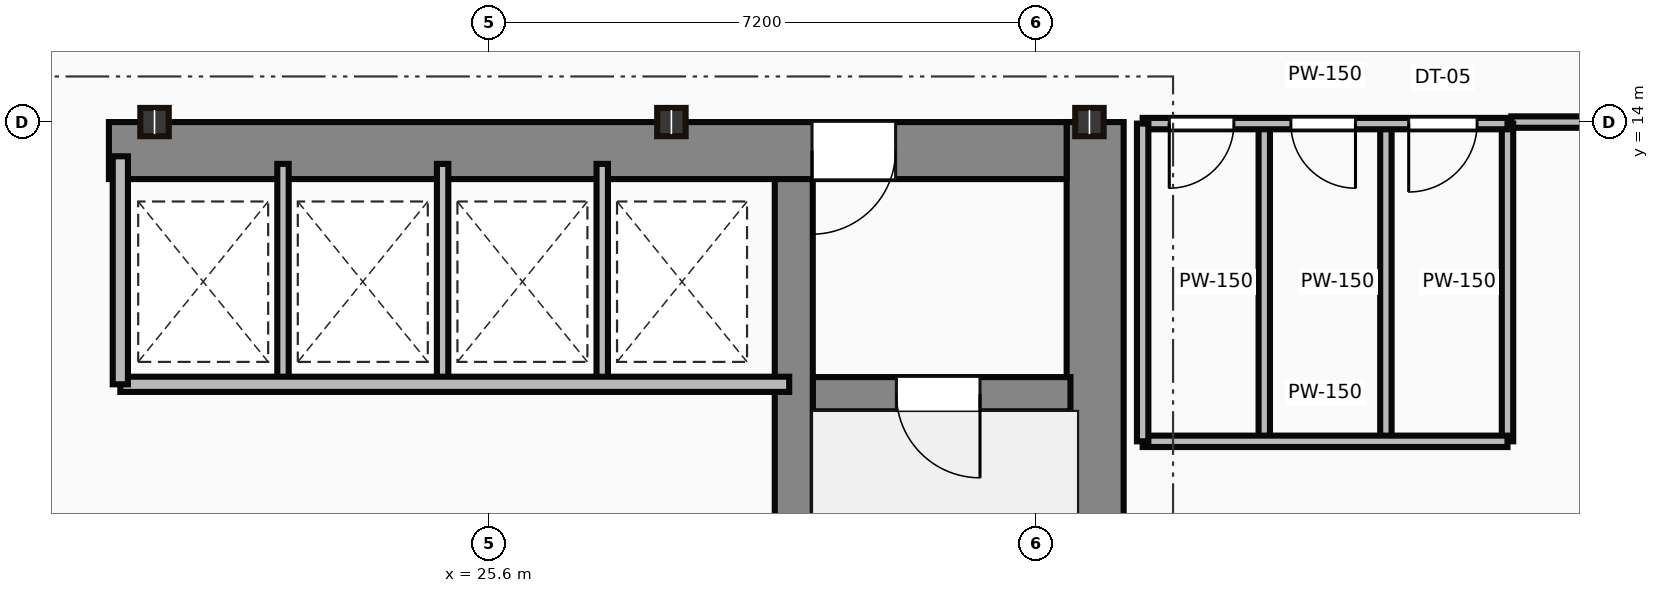
"""IFC4 building model, lengths in metres.
Left out: names, types, materials, properties, quantities, classifications, styles, units other than length and angle.
Written with IfcOpenShell. Run it as: python <this file> out.ifc"""

import sys

from ifc_helpers import new_model, si_unit, direction, frame, frame_2d, origin, origin_2d, place, context, subcontext, project, spatial, rectangle, i_section, extrude, source, transform, mapped, element, fill, save


model = new_model("IFC4")
c1 = context("Model", 3, precision=1e-05, world=origin(), true_north=direction((0.0, 1.0)))
c2 = subcontext(c1, "Body", "Model", "MODEL_VIEW")
j1 = project(units=[si_unit("LENGTHUNIT", "METRE"), si_unit("PLANEANGLEUNIT", "RADIAN")], contexts=[c1])
p1 = place(None, origin())
s1 = spatial("IfcSite", under=j1, at=p1, CompositionType="ELEMENT")
p2 = place(p1, origin())
s2 = spatial("IfcBuilding", under=s1, at=p2, CompositionType="ELEMENT")
p3 = place(p2, frame((0.0, 0.0, 147.9)))
s3 = spatial("IfcBuildingStorey", under=s2, at=p3, CompositionType="ELEMENT", Elevation=147.9)
m1 = source(origin(), c2, "Body", "SweptSolid", [
    extrude(rectangle(XDim=13.1, YDim=0.75, at=frame_2d((6.55, 0.0))), origin(), (0.0, 0.0, 1.0), 3.65),
])
p4 = place(p3, frame((33.575, 0.9, 0.0), z_axis=(0.0, 0.0, 1.0), x_axis=(0.0, 1.0, 0.0)))
e1 = element("IfcWall", 1, at=p4, inside=s3, PredefinedType="SHEAR", context=c2, shape_type="MappedRepresentation", body=[
    mapped(m1, transform((0.0, 0.0, 0.0))),
])
m2 = source(origin(), c2, "Body", "SweptSolid", [
    extrude(rectangle(XDim=12.6, YDim=0.75, at=frame_2d((6.3, 0.0))), origin(), (0.0, 0.0, 1.0), 3.65),
])
p5 = place(p3, frame((20.6, 13.625, 0.0), z_axis=(0.0, 0.0, 1.0), x_axis=(1.0, 0.0, 0.0)))
e2 = element("IfcWall", 2, at=p5, inside=s3, PredefinedType="SHEAR", context=c2, shape_type="MappedRepresentation", body=[
    mapped(m2, transform((0.0, 0.0, 0.0))),
])
p6 = place(p5, frame((9.25, 0.0, 0.0)))
e3 = element("IfcOpeningElement", 3, at=p6, cuts=e2, PredefinedType="OPENING", context=c2, shape_type="SweptSolid", body=[
    extrude(rectangle(XDim=1.1, YDim=2.15, at=frame_2d((0.55, 1.075))), frame((0.0, 0.385, 0.0), z_axis=(0.0, -1.0, 0.0), x_axis=(1.0, 0.0, 0.0)), (0.0, 0.0, 1.0), 0.77),
])
m3 = source(origin(), c2, "Body", "SweptSolid", [
    extrude(rectangle(XDim=12.35, YDim=0.5, at=frame_2d((6.175, 0.0))), origin(), (0.0, 0.0, 1.0), 3.65),
])
p7 = place(p3, frame((29.61, 0.9, 0.0), z_axis=(0.0, 0.0, 1.0), x_axis=(0.0, 1.0, 0.0)))
e4 = element("IfcWall", 4, at=p7, inside=s3, PredefinedType="SHEAR", context=c2, shape_type="MappedRepresentation", body=[
    mapped(m3, transform((0.0, 0.0, 0.0))),
])
m4 = source(origin(), c2, "Body", "SweptSolid", [
    extrude(rectangle(XDim=3.39, YDim=0.45, at=frame_2d((1.695, 0.0))), origin(), (0.0, 0.0, 1.0), 3.65),
])
p8 = place(p3, frame((29.86, 10.42, 0.0), z_axis=(0.0, 0.0, 1.0), x_axis=(1.0, 0.0, 0.0)))
e5 = element("IfcWall", 5, at=p8, inside=s3, PredefinedType="SHEAR", context=c2, shape_type="MappedRepresentation", body=[
    mapped(m4, transform((0.0, 0.0, 0.0))),
])
p9 = place(p8, frame((1.1, 0.0, 0.0)))
e6 = element("IfcOpeningElement", 6, at=p9, cuts=e5, PredefinedType="OPENING", context=c2, shape_type="SweptSolid", body=[
    extrude(rectangle(XDim=1.1, YDim=2.15, at=frame_2d((0.55, 1.075))), frame((0.0, 0.235, 0.0), z_axis=(0.0, -1.0, 0.0), x_axis=(1.0, 0.0, 0.0)), (0.0, 0.0, 1.0), 0.47),
])
m5 = source(origin(), c2, "Body", "SweptSolid", [
    extrude(i_section(OverallWidth=0.374, OverallDepth=0.372, WebThickness=0.016, FlangeThickness=0.026, at=origin_2d()), origin(), (0.0, 0.0, 1.0), 3.65),
])
for number, where, z_axis, x_axis in (
    (7, (21.2, 14.0, 0.0), (0.0, 0.0, 1.0), (1.0, 0.0, 0.0)),
    (8, (28.0, 14.0, 0.0), (0.0, 0.0, 1.0), (1.0, 0.0, 0.0)),
    (9, (33.5, 14.0, 0.0), (0.0, 0.0, 1.0), (1.0, 0.0, 0.0)),
):
    element("IfcColumn", number, at=place(p3, frame(where, z_axis=z_axis, x_axis=x_axis)), inside=s3, PredefinedType="COLUMN", context=c2, shape_type="MappedRepresentation", body=[
        mapped(m5, transform((0.0, 0.0, 0.0))),
    ])
m6 = source(origin(), c2, "Body", "SweptSolid", [
    extrude(rectangle(XDim=8.8, YDim=0.2, at=frame_2d((4.4, 0.0))), origin(), (0.0, 0.0, 1.0), 3.4),
])
p10 = place(p3, frame((20.75, 10.55, 0.0), z_axis=(0.0, 0.0, 1.0), x_axis=(1.0, 0.0, 0.0)))
e10 = element("IfcWall", 10, at=p10, inside=s3, PredefinedType="PARTITIONING", context=c2, shape_type="MappedRepresentation", body=[
    mapped(m6, transform((0.0, 0.0, 0.0))),
])
m7 = source(origin(), c2, "Body", "SweptSolid", [
    extrude(rectangle(XDim=3.0, YDim=0.2, at=frame_2d((1.5, 0.0))), origin(), (0.0, 0.0, 1.0), 3.4),
])
p11 = place(p3, frame((20.75, 10.55, 0.0), z_axis=(0.0, 0.0, 1.0), x_axis=(0.0, 1.0, 0.0)))
e11 = element("IfcWall", 11, at=p11, inside=s3, PredefinedType="PARTITIONING", context=c2, shape_type="MappedRepresentation", body=[
    mapped(m7, transform((0.0, 0.0, 0.0))),
])
m8 = source(origin(), c2, "Body", "SweptSolid", [
    extrude(rectangle(XDim=2.85, YDim=0.15, at=frame_2d((1.425, 0.0))), origin(), (0.0, 0.0, 1.0), 3.4),
])
for number, where, z_axis, x_axis in (
    (12, (22.89, 10.6, 0.0), (0.0, 0.0, 1.0), (0.0, 1.0, 0.0)),
    (13, (24.99, 10.6, 0.0), (0.0, 0.0, 1.0), (0.0, 1.0, 0.0)),
    (14, (27.09, 10.6, 0.0), (0.0, 0.0, 1.0), (0.0, 1.0, 0.0)),
):
    element("IfcWall", number, at=place(p3, frame(where, z_axis=z_axis, x_axis=x_axis)), inside=s3, PredefinedType="PARTITIONING", context=c2, shape_type="MappedRepresentation", body=[
        mapped(m8, transform((0.0, 0.0, 0.0))),
    ])
m9 = source(origin(), c2, "Body", "SweptSolid", [
    extrude(rectangle(XDim=4.8, YDim=0.15, at=frame_2d((2.4, 0.0))), origin(), (0.0, 0.0, 1.0), 2.76),
])
p12 = place(p3, frame((34.2, 13.98, 0.0), z_axis=(0.0, 0.0, 1.0), x_axis=(1.0, 0.0, 0.0)))
e15 = element("IfcWall", 15, at=p12, inside=s3, PredefinedType="PARTITIONING", context=c2, shape_type="MappedRepresentation", body=[
    mapped(m9, transform((0.0, 0.0, 0.0))),
])
p13 = place(p12, frame((0.35, 0.0, 0.0)))
e16 = element("IfcOpeningElement", 16, at=p13, cuts=e15, PredefinedType="OPENING", context=c2, shape_type="SweptSolid", body=[
    extrude(rectangle(XDim=0.85, YDim=2.1, at=frame_2d((0.425, 1.05))), frame((0.0, 0.085, 0.0), z_axis=(0.0, -1.0, 0.0), x_axis=(1.0, 0.0, 0.0)), (0.0, 0.0, 1.0), 0.17),
])
p14 = place(p12, frame((1.95, 0.0, 0.0)))
e17 = element("IfcOpeningElement", 17, at=p14, cuts=e15, PredefinedType="OPENING", context=c2, shape_type="SweptSolid", body=[
    extrude(rectangle(XDim=0.85, YDim=2.1, at=frame_2d((0.425, 1.05))), frame((0.0, 0.085, 0.0), z_axis=(0.0, -1.0, 0.0), x_axis=(1.0, 0.0, 0.0)), (0.0, 0.0, 1.0), 0.17),
])
p15 = place(p12, frame((3.5, 0.0, 0.0)))
e18 = element("IfcOpeningElement", 18, at=p15, cuts=e15, PredefinedType="OPENING", context=c2, shape_type="SweptSolid", body=[
    extrude(rectangle(XDim=0.9, YDim=2.1, at=frame_2d((0.45, 1.05))), frame((0.0, 0.085, 0.0), z_axis=(0.0, -1.0, 0.0), x_axis=(1.0, 0.0, 0.0)), (0.0, 0.0, 1.0), 0.17),
])
m10 = source(origin(), c2, "Body", "SweptSolid", [
    extrude(rectangle(XDim=4.8, YDim=0.15, at=frame_2d((2.4, 0.0))), origin(), (0.0, 0.0, 1.0), 3.4),
])
p16 = place(p3, frame((34.2, 9.8, 0.0), z_axis=(0.0, 0.0, 1.0), x_axis=(1.0, 0.0, 0.0)))
e19 = element("IfcWall", 19, at=p16, inside=s3, PredefinedType="PARTITIONING", context=c2, shape_type="MappedRepresentation", body=[
    mapped(m10, transform((0.0, 0.0, 0.0))),
])
m11 = source(origin(), c2, "Body", "SweptSolid", [
    extrude(rectangle(XDim=4.18, YDim=0.15, at=frame_2d((2.09, 0.0))), origin(), (0.0, 0.0, 1.0), 3.4),
])
for number, where, z_axis, x_axis in (
    (20, (39.0, 9.8, 0.0), (0.0, 0.0, 1.0), (0.0, 1.0, 0.0)),
    (21, (34.2, 9.8, 0.0), (0.0, 0.0, 1.0), (0.0, 1.0, 0.0)),
    (22, (35.8, 9.8, 0.0), (0.0, 0.0, 1.0), (0.0, 1.0, 0.0)),
    (23, (37.4, 9.8, 0.0), (0.0, 0.0, 1.0), (0.0, 1.0, 0.0)),
):
    element("IfcWall", number, at=place(p3, frame(where, z_axis=z_axis, x_axis=x_axis)), inside=s3, PredefinedType="PARTITIONING", context=c2, shape_type="MappedRepresentation", body=[
        mapped(m11, transform((0.0, 0.0, 0.0))),
    ])
m12 = source(origin(), c2, "Body", "SweptSolid", [
    extrude(rectangle(XDim=1.75, YDim=0.15, at=frame_2d((0.875, 0.0))), origin(), (0.0, 0.0, 1.0), 2.76),
])
p17 = place(p3, frame((40.8, 14.0, 0.0), z_axis=(0.0, 0.0, 1.0), x_axis=(-1.0, 0.0, 0.0)))
e24 = element("IfcWall", 24, at=p17, inside=s3, PredefinedType="PARTITIONING", context=c2, shape_type="MappedRepresentation", body=[
    mapped(m12, transform((0.0, 0.0, 0.0))),
])
m13 = source(origin(), c2, "Body", "SweptSolid", [
    extrude(rectangle(XDim=1.1, YDim=2.15, at=frame_2d((0.55, 1.075))), frame((0.0, 0.025, 0.0), z_axis=(0.0, -1.0, 0.0), x_axis=(1.0, 0.0, 0.0)), (0.0, 0.0, 1.0), 0.05),
])
p18 = place(p9, frame((1.1, 0.0, 0.0), z_axis=(0.0, 0.0, 1.0), x_axis=(-1.0, 0.0, 0.0)))
e25 = element("IfcDoor", 25, at=p18, inside=s3, OperationType="SINGLE_SWING_RIGHT", PredefinedType="DOOR", context=c2, shape_type="MappedRepresentation", body=[
    mapped(m13, transform((0.0, 0.0, 0.0))),
])
fill(e6, e25)
p19 = place(p6, origin())
e26 = element("IfcDoor", 26, at=p19, inside=s3, OperationType="SINGLE_SWING_LEFT", PredefinedType="DOOR", context=c2, shape_type="MappedRepresentation", body=[
    mapped(m13, transform((0.0, 0.0, 0.0))),
])
fill(e3, e26)
m14 = source(origin(), c2, "Body", "SweptSolid", [
    extrude(rectangle(XDim=0.85, YDim=2.1, at=frame_2d((0.425, 1.05))), frame((0.0, 0.025, 0.0), z_axis=(0.0, -1.0, 0.0), x_axis=(1.0, 0.0, 0.0)), (0.0, 0.0, 1.0), 0.05),
])
p20 = place(p13, frame((0.85, 0.0, 0.0), z_axis=(0.0, 0.0, 1.0), x_axis=(-1.0, 0.0, 0.0)))
e27 = element("IfcDoor", 27, at=p20, inside=s3, OperationType="SINGLE_SWING_LEFT", PredefinedType="DOOR", context=c2, shape_type="MappedRepresentation", body=[
    mapped(m14, transform((0.0, 0.0, 0.0))),
])
fill(e16, e27)
p21 = place(p14, frame((0.85, 0.0, 0.0), z_axis=(0.0, 0.0, 1.0), x_axis=(-1.0, 0.0, 0.0)))
e28 = element("IfcDoor", 28, at=p21, inside=s3, OperationType="SINGLE_SWING_RIGHT", PredefinedType="DOOR", context=c2, shape_type="MappedRepresentation", body=[
    mapped(m14, transform((0.0, 0.0, 0.0))),
])
fill(e17, e28)
m15 = source(origin(), c2, "Body", "SweptSolid", [
    extrude(rectangle(XDim=0.9, YDim=2.1, at=frame_2d((0.45, 1.05))), frame((0.0, 0.025, 0.0), z_axis=(0.0, -1.0, 0.0), x_axis=(1.0, 0.0, 0.0)), (0.0, 0.0, 1.0), 0.05),
])
p22 = place(p15, frame((0.9, 0.0, 0.0), z_axis=(0.0, 0.0, 1.0), x_axis=(-1.0, 0.0, 0.0)))
e29 = element("IfcDoor", 29, at=p22, inside=s3, OperationType="SINGLE_SWING_LEFT", PredefinedType="DOOR", context=c2, shape_type="MappedRepresentation", body=[
    mapped(m15, transform((0.0, 0.0, 0.0))),
])
fill(e18, e29)
save(model, sys.argv[1])
